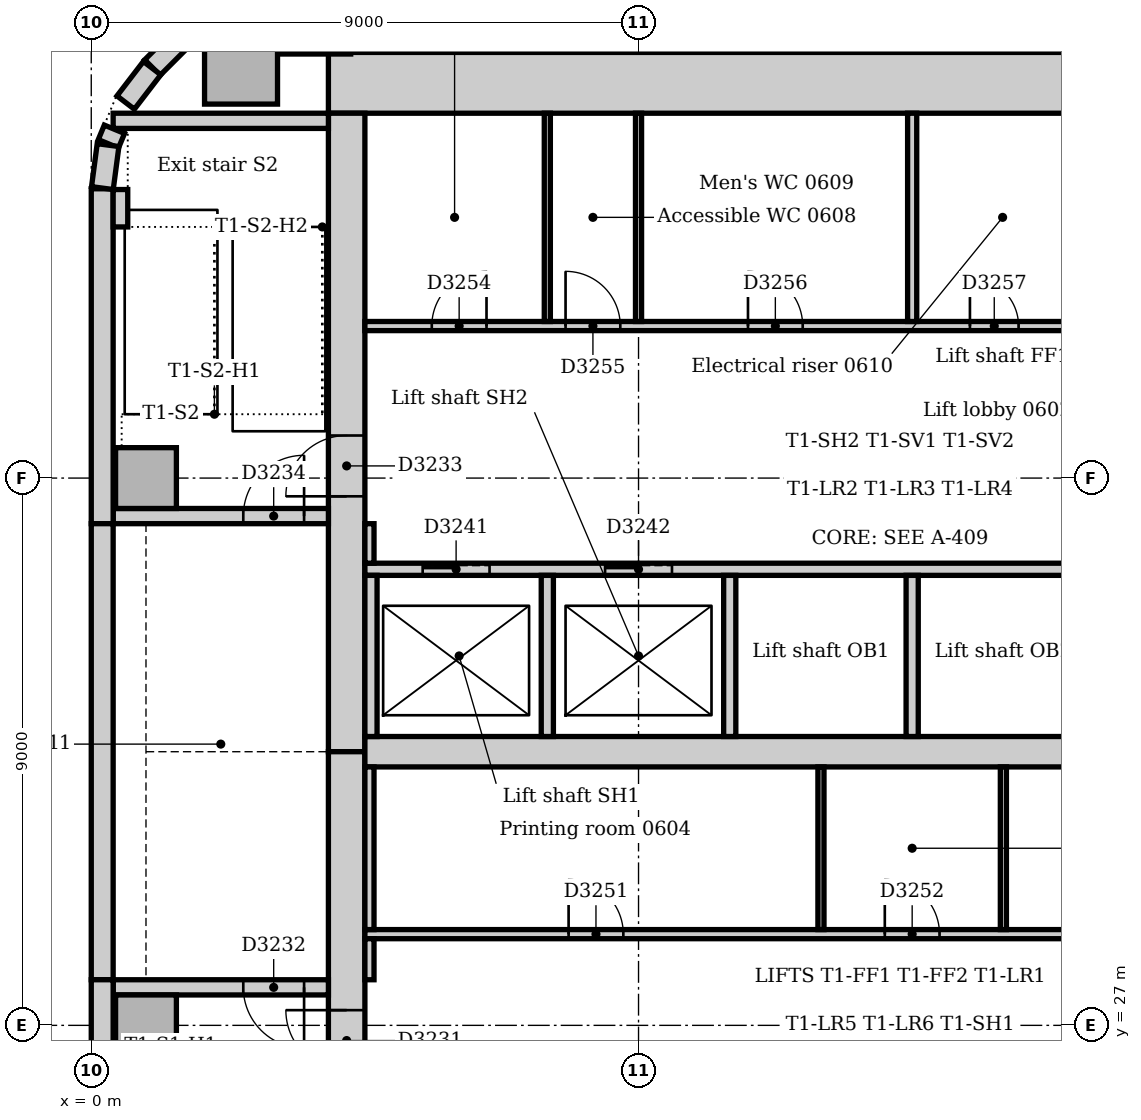
"""IFC4 building model, lengths in metres.
Left out: names, types, materials, properties, quantities, classifications, styles, units other than length and angle.
Written with IfcOpenShell. Run it as: python <this file> out.ifc"""

import sys

from ifc_helpers import new_model, si_unit, direction, frame, frame_2d, origin, origin_2d, place, context, subcontext, project, spatial, rectangle, extrude, element, fill, save


model = new_model("IFC4")
c1 = context("Model", 3, precision=1e-05, world=origin(), true_north=direction((0.0, 1.0)))
c2 = subcontext(c1, "Body", "Model", "MODEL_VIEW")
j1 = project(units=[si_unit("LENGTHUNIT", "METRE"), si_unit("PLANEANGLEUNIT", "RADIAN")], contexts=[c1])
p1 = place(None, origin())
s1 = spatial("IfcSite", under=j1, at=p1, CompositionType="ELEMENT")
p2 = place(p1, origin())
s2 = spatial("IfcBuilding", under=s1, at=p2, CompositionType="ELEMENT")
p3 = place(p2, frame((0.0, 0.0, 30.0)))
s3 = spatial("IfcBuildingStorey", under=s2, at=p3, CompositionType="ELEMENT", Elevation=30.0)
p4 = place(p3, frame((23.5, 42.5, 0.0), z_axis=(0.0, 0.0, 1.0), x_axis=(-1.0, 0.0, 0.0)))
e1 = element("IfcWall", 1, at=p4, inside=s3, PredefinedType="SOLIDWALL", context=c2, shape_type="SweptSolid", body=[
    extrude(rectangle(XDim=19.6, YDim=1.0, at=frame_2d((9.8, 0.0))), origin(), (0.0, 0.0, 1.0), 4.0),
])
p5 = place(p3, frame((4.2, 42.0, 0.0), z_axis=(0.0, 0.0, 1.0), x_axis=(0.0, -1.0, 0.0)))
e2 = element("IfcWall", 2, at=p5, inside=s3, PredefinedType="SOLIDWALL", context=c2, shape_type="SweptSolid", body=[
    extrude(rectangle(XDim=10.5, YDim=0.6, at=frame_2d((5.25, 0.0))), origin(), (0.0, 0.0, 1.0), 4.0),
])
p6 = place(p5, frame((5.3, 0.0, 0.0)))
e3 = element("IfcOpeningElement", 3, at=p6, cuts=e2, PredefinedType="OPENING", context=c2, shape_type="SweptSolid", body=[
    extrude(rectangle(XDim=1.0, YDim=2.1, at=frame_2d((0.5, 1.05))), frame((0.0, 0.31, 0.0), z_axis=(0.0, -1.0, 0.0), x_axis=(1.0, 0.0, 0.0)), (0.0, 0.0, 1.0), 0.62),
])
p7 = place(p3, frame((4.2, 31.5, 0.0), z_axis=(0.0, 0.0, 1.0), x_axis=(0.0, -1.0, 0.0)))
e4 = element("IfcWall", 4, at=p7, inside=s3, PredefinedType="SOLIDWALL", context=c2, shape_type="SweptSolid", body=[
    extrude(rectangle(XDim=10.5, YDim=0.6, at=frame_2d((5.25, 0.0))), origin(), (0.0, 0.0, 1.0), 4.0),
])
p8 = place(p7, frame((4.25, 0.0, 0.0)))
e5 = element("IfcOpeningElement", 5, at=p8, cuts=e4, PredefinedType="OPENING", context=c2, shape_type="SweptSolid", body=[
    extrude(rectangle(XDim=1.0, YDim=2.1, at=frame_2d((0.5, 1.05))), frame((0.0, 0.31, 0.0), z_axis=(0.0, -1.0, 0.0), x_axis=(1.0, 0.0, 0.0)), (0.0, 0.0, 1.0), 0.62),
])
p9 = place(p3, frame((4.5, 31.5, 0.0), z_axis=(0.0, 0.0, 1.0), x_axis=(1.0, 0.0, 0.0)))
e6 = element("IfcWall", 6, at=p9, inside=s3, PredefinedType="SOLIDWALL", context=c2, shape_type="SweptSolid", body=[
    extrude(rectangle(XDim=18.0, YDim=0.5, at=frame_2d((9.0, 0.0))), origin(), (0.0, 0.0, 1.0), 4.0),
])
p10 = place(p3, frame((3.9, 27.625, 0.0), z_axis=(0.0, 0.0, 1.0), x_axis=(-1.0, 0.0, 0.0)))
e7 = element("IfcWall", 7, at=p10, inside=s3, PredefinedType="SOLIDWALL", context=c2, shape_type="SweptSolid", body=[
    extrude(rectangle(XDim=3.54, YDim=0.25, at=frame_2d((1.77, 0.0))), origin(), (0.0, 0.0, 1.0), 4.0),
])
p11 = place(p10, frame((0.4, 0.0, 0.0)))
e8 = element("IfcOpeningElement", 8, at=p11, cuts=e7, PredefinedType="OPENING", context=c2, shape_type="SweptSolid", body=[
    extrude(rectangle(XDim=1.0, YDim=2.1, at=frame_2d((0.5, 1.05))), frame((0.0, 0.135, 0.0), z_axis=(0.0, -1.0, 0.0), x_axis=(1.0, 0.0, 0.0)), (0.0, 0.0, 1.0), 0.27),
])
p12 = place(p3, frame((0.36, 35.375, 0.0), z_axis=(0.0, 0.0, 1.0), x_axis=(1.0, 0.0, 0.0)))
e9 = element("IfcWall", 9, at=p12, inside=s3, PredefinedType="SOLIDWALL", context=c2, shape_type="SweptSolid", body=[
    extrude(rectangle(XDim=3.54, YDim=0.25, at=frame_2d((1.77, 0.0))), origin(), (0.0, 0.0, 1.0), 4.0),
])
p13 = place(p12, frame((2.14, 0.0, 0.0)))
e10 = element("IfcOpeningElement", 10, at=p13, cuts=e9, PredefinedType="OPENING", context=c2, shape_type="SweptSolid", body=[
    extrude(rectangle(XDim=1.0, YDim=2.1, at=frame_2d((0.5, 1.05))), frame((0.0, 0.135, 0.0), z_axis=(0.0, -1.0, 0.0), x_axis=(1.0, 0.0, 0.0)), (0.0, 0.0, 1.0), 0.27),
])
p14 = place(p3, frame((3.9, 41.875, 0.0), z_axis=(0.0, 0.0, 1.0), x_axis=(-1.0, 0.0, 0.0)))
e11 = element("IfcWall", 11, at=p14, inside=s3, PredefinedType="SOLIDWALL", context=c2, shape_type="SweptSolid", body=[
    extrude(rectangle(XDim=3.54, YDim=0.25, at=frame_2d((1.77, 0.0))), origin(), (0.0, 0.0, 1.0), 4.0),
])
for number, where, z_axis, x_axis in (
    (12, (3.667, 43.574, 0.0), (0.0, 0.0, 1.0), (1.0, 0.0, 0.0)),
    (13, (2.463, 42.75, 0.0), (0.0, 0.0, 1.0), (1.0, 0.0, 0.0)),
):
    element("IfcColumn", number, at=place(p3, frame(where, z_axis=z_axis, x_axis=x_axis)), inside=s3, PredefinedType="COLUMN", context=c2, shape_type="SweptSolid", body=[
        extrude(rectangle(XDim=1.2, YDim=1.2, at=origin_2d()), origin(), (0.0, 0.0, 1.0), 3.85),
    ])
for number, where, z_axis, x_axis in (
    (14, (0.9, 27.0, 0.0), (0.0, 0.0, 1.0), (1.0, 0.0, 0.0)),
    (15, (0.9, 36.0, 0.0), (0.0, 0.0, 1.0), (1.0, 0.0, 0.0)),
):
    element("IfcColumn", number, at=place(p3, frame(where, z_axis=z_axis, x_axis=x_axis)), inside=s3, PredefinedType="COLUMN", context=c2, shape_type="SweptSolid", body=[
        extrude(rectangle(XDim=1.0, YDim=1.0, at=origin_2d()), origin(), (0.0, 0.0, 1.0), 4.0),
    ])
p15 = place(p3, frame((2.249, 43.994, 0.0), z_axis=(0.0, 0.0, 1.0), x_axis=(-0.707106781187, -0.707106781187, 0.0)))
e16 = element("IfcWall", 16, at=p15, inside=s3, PredefinedType="STANDARD", context=c2, shape_type="SweptSolid", body=[
    extrude(rectangle(XDim=1.757, YDim=0.36, at=frame_2d((0.879, 0.0))), origin(), (0.0, 0.0, 1.0), 3.85),
])
p16 = place(p3, frame((0.18, 40.757, 0.0), z_axis=(0.0, 0.0, 1.0), x_axis=(0.0, -1.0, 0.0)))
e17 = element("IfcWall", 17, at=p16, inside=s3, PredefinedType="STANDARD", context=c2, shape_type="SweptSolid", body=[
    extrude(rectangle(XDim=5.507, YDim=0.36, at=frame_2d((2.754, 0.0))), origin(), (0.0, 0.0, 1.0), 3.85),
])
p17 = place(p3, frame((0.18, 35.25, 0.0), z_axis=(0.0, 0.0, 1.0), x_axis=(0.0, -1.0, 0.0)))
e18 = element("IfcWall", 18, at=p17, inside=s3, PredefinedType="STANDARD", context=c2, shape_type="SweptSolid", body=[
    extrude(rectangle(XDim=7.5, YDim=0.36, at=frame_2d((3.75, 0.0))), origin(), (0.0, 0.0, 1.0), 3.85),
])
p18 = place(p3, frame((0.18, 27.75, 0.0), z_axis=(0.0, 0.0, 1.0), x_axis=(0.0, -1.0, 0.0)))
e19 = element("IfcWall", 19, at=p18, inside=s3, PredefinedType="STANDARD", context=c2, shape_type="SweptSolid", body=[
    extrude(rectangle(XDim=6.75, YDim=0.36, at=frame_2d((3.375, 0.0))), origin(), (0.0, 0.0, 1.0), 3.85),
])
p19 = place(p3, frame((1.0, 42.741, 0.0), z_axis=(0.0, 0.0, 1.0), x_axis=(-0.608802368033, -0.793321924995, 0.0)))
e20 = element("IfcWall", 20, at=p19, inside=s3, PredefinedType="STANDARD", context=c2, shape_type="SweptSolid", body=[
    extrude(rectangle(XDim=0.713, YDim=0.36, at=frame_2d((0.357, 0.0))), origin(), (0.0, 0.0, 1.0), 3.85),
])
p20 = place(p3, frame((0.381, 41.736, 0.0), z_axis=(0.0, 0.0, 1.0), x_axis=(-0.382773360986, -0.923842277729, 0.0)))
e21 = element("IfcWall", 21, at=p20, inside=s3, PredefinedType="STANDARD", context=c2, shape_type="SweptSolid", body=[
    extrude(rectangle(XDim=0.258, YDim=0.36, at=frame_2d((0.129, 0.0))), origin(), (0.0, 0.0, 1.0), 3.85),
])
p21 = place(p3, frame((0.276, 41.476, 0.0), z_axis=(0.0, 0.0, 1.0), x_axis=(-0.13055608231, -0.99144092581, 0.0)))
e22 = element("IfcWall", 22, at=p21, inside=s3, PredefinedType="STANDARD", context=c2, shape_type="SweptSolid", body=[
    extrude(rectangle(XDim=0.713, YDim=0.36, at=frame_2d((0.356, 0.0))), origin(), (0.0, 0.0, 1.0), 3.85),
])
p22 = place(p3, frame((0.48, 40.13, 0.0), z_axis=(0.0, 0.0, 1.0), x_axis=(0.0, 1.0, 0.0)))
e23 = element("IfcWall", 23, at=p22, inside=s3, PredefinedType="STANDARD", context=c2, shape_type="SweptSolid", body=[
    extrude(rectangle(XDim=0.615, YDim=0.24, at=frame_2d((0.307, 0.0))), origin(), (0.0, 0.0, 1.0), 4.0),
])
p23 = place(p3, frame((4.5, 34.5, 0.0), z_axis=(0.0, 0.0, 1.0), x_axis=(1.0, 0.0, 0.0)))
e24 = element("IfcWall", 24, at=p23, inside=s3, PredefinedType="PARTITIONING", context=c2, shape_type="SweptSolid", body=[
    extrude(rectangle(XDim=18.0, YDim=0.2, at=frame_2d((9.0, 0.0))), origin(), (0.0, 0.0, 1.0), 3.85),
])
p24 = place(p23, frame((0.95, 0.0, 0.0)))
e25 = element("IfcOpeningElement", 25, at=p24, cuts=e24, PredefinedType="OPENING", context=c2, shape_type="SweptSolid", body=[
    extrude(rectangle(XDim=1.1, YDim=2.1, at=frame_2d((0.55, 1.05))), frame((0.0, 0.11, 0.0), z_axis=(0.0, -1.0, 0.0), x_axis=(1.0, 0.0, 0.0)), (0.0, 0.0, 1.0), 0.22),
])
p25 = place(p23, frame((3.95, 0.0, 0.0)))
e26 = element("IfcOpeningElement", 26, at=p25, cuts=e24, PredefinedType="OPENING", context=c2, shape_type="SweptSolid", body=[
    extrude(rectangle(XDim=1.1, YDim=2.1, at=frame_2d((0.55, 1.05))), frame((0.0, 0.11, 0.0), z_axis=(0.0, -1.0, 0.0), x_axis=(1.0, 0.0, 0.0)), (0.0, 0.0, 1.0), 0.22),
])
p26 = place(p23, frame((12.95, 0.0, 0.0)))
e27 = element("IfcOpeningElement", 27, at=p26, cuts=e24, PredefinedType="OPENING", context=c2, shape_type="SweptSolid", body=[
    extrude(rectangle(XDim=1.1, YDim=2.1, at=frame_2d((0.55, 1.05))), frame((0.0, 0.11, 0.0), z_axis=(0.0, -1.0, 0.0), x_axis=(1.0, 0.0, 0.0)), (0.0, 0.0, 1.0), 0.22),
])
p27 = place(p23, frame((15.95, 0.0, 0.0)))
e28 = element("IfcOpeningElement", 28, at=p27, cuts=e24, PredefinedType="OPENING", context=c2, shape_type="SweptSolid", body=[
    extrude(rectangle(XDim=1.1, YDim=2.1, at=frame_2d((0.55, 1.05))), frame((0.0, 0.11, 0.0), z_axis=(0.0, -1.0, 0.0), x_axis=(1.0, 0.0, 0.0)), (0.0, 0.0, 1.0), 0.22),
])
for number, where, z_axis, x_axis in (
    (29, (4.6, 31.75, 0.0), (0.0, 0.0, 1.0), (0.0, 1.0, 0.0)),
    (30, (7.5, 31.75, 0.0), (0.0, 0.0, 1.0), (0.0, 1.0, 0.0)),
    (31, (10.5, 31.75, 0.0), (0.0, 0.0, 1.0), (0.0, 1.0, 0.0)),
    (32, (13.5, 31.75, 0.0), (0.0, 0.0, 1.0), (0.0, 1.0, 0.0)),
):
    element("IfcWall", number, at=place(p3, frame(where, z_axis=z_axis, x_axis=x_axis)), inside=s3, PredefinedType="PARTITIONING", context=c2, shape_type="SweptSolid", body=[
        extrude(rectangle(XDim=2.65, YDim=0.2, at=frame_2d((1.325, 0.0))), origin(), (0.0, 0.0, 1.0), 3.85),
    ])
p28 = place(p3, frame((4.5, 28.5, 0.0), z_axis=(0.0, 0.0, 1.0), x_axis=(1.0, 0.0, 0.0)))
e33 = element("IfcWall", 33, at=p28, inside=s3, PredefinedType="PARTITIONING", context=c2, shape_type="SweptSolid", body=[
    extrude(rectangle(XDim=18.0, YDim=0.15, at=frame_2d((9.0, 0.0))), origin(), (0.0, 0.0, 1.0), 3.85),
])
p29 = place(p28, frame((3.35, 0.0, 0.0)))
e34 = element("IfcOpeningElement", 34, at=p29, cuts=e33, PredefinedType="OPENING", context=c2, shape_type="SweptSolid", body=[
    extrude(rectangle(XDim=0.9, YDim=2.1, at=frame_2d((0.45, 1.05))), frame((0.0, 0.085, 0.0), z_axis=(0.0, -1.0, 0.0), x_axis=(1.0, 0.0, 0.0)), (0.0, 0.0, 1.0), 0.17),
])
p30 = place(p28, frame((8.55, 0.0, 0.0)))
e35 = element("IfcOpeningElement", 35, at=p30, cuts=e33, PredefinedType="OPENING", context=c2, shape_type="SweptSolid", body=[
    extrude(rectangle(XDim=0.9, YDim=2.1, at=frame_2d((0.45, 1.05))), frame((0.0, 0.085, 0.0), z_axis=(0.0, -1.0, 0.0), x_axis=(1.0, 0.0, 0.0)), (0.0, 0.0, 1.0), 0.17),
])
p31 = place(p28, frame((13.7, 0.0, 0.0)))
e36 = element("IfcOpeningElement", 36, at=p31, cuts=e33, PredefinedType="OPENING", context=c2, shape_type="SweptSolid", body=[
    extrude(rectangle(XDim=0.9, YDim=2.1, at=frame_2d((0.45, 1.05))), frame((0.0, 0.085, 0.0), z_axis=(0.0, -1.0, 0.0), x_axis=(1.0, 0.0, 0.0)), (0.0, 0.0, 1.0), 0.17),
])
p32 = place(p3, frame((4.5, 38.5, 0.0), z_axis=(0.0, 0.0, 1.0), x_axis=(1.0, 0.0, 0.0)))
e37 = element("IfcWall", 37, at=p32, inside=s3, PredefinedType="PARTITIONING", context=c2, shape_type="SweptSolid", body=[
    extrude(rectangle(XDim=11.9, YDim=0.15, at=frame_2d((5.95, 0.0))), origin(), (0.0, 0.0, 1.0), 3.85),
])
p33 = place(p32, frame((1.1, 0.0, 0.0)))
e38 = element("IfcOpeningElement", 38, at=p33, cuts=e37, PredefinedType="OPENING", context=c2, shape_type="SweptSolid", body=[
    extrude(rectangle(XDim=0.9, YDim=2.1, at=frame_2d((0.45, 1.05))), frame((0.0, 0.085, 0.0), z_axis=(0.0, -1.0, 0.0), x_axis=(1.0, 0.0, 0.0)), (0.0, 0.0, 1.0), 0.17),
])
p34 = place(p32, frame((3.3, 0.0, 0.0)))
e39 = element("IfcOpeningElement", 39, at=p34, cuts=e37, PredefinedType="OPENING", context=c2, shape_type="SweptSolid", body=[
    extrude(rectangle(XDim=0.9, YDim=2.1, at=frame_2d((0.45, 1.05))), frame((0.0, 0.085, 0.0), z_axis=(0.0, -1.0, 0.0), x_axis=(1.0, 0.0, 0.0)), (0.0, 0.0, 1.0), 0.17),
])
p35 = place(p32, frame((6.3, 0.0, 0.0)))
e40 = element("IfcOpeningElement", 40, at=p35, cuts=e37, PredefinedType="OPENING", context=c2, shape_type="SweptSolid", body=[
    extrude(rectangle(XDim=0.9, YDim=2.1, at=frame_2d((0.45, 1.05))), frame((0.0, 0.085, 0.0), z_axis=(0.0, -1.0, 0.0), x_axis=(1.0, 0.0, 0.0)), (0.0, 0.0, 1.0), 0.17),
])
p36 = place(p32, frame((9.95, 0.0, 0.0)))
e41 = element("IfcOpeningElement", 41, at=p36, cuts=e37, PredefinedType="OPENING", context=c2, shape_type="SweptSolid", body=[
    extrude(rectangle(XDim=0.8, YDim=2.1, at=frame_2d((0.4, 1.05))), frame((0.0, 0.085, 0.0), z_axis=(0.0, -1.0, 0.0), x_axis=(1.0, 0.0, 0.0)), (0.0, 0.0, 1.0), 0.17),
])
p37 = place(p3, frame((4.575, 27.75, 0.0), z_axis=(0.0, 0.0, 1.0), x_axis=(0.0, 1.0, 0.0)))
e42 = element("IfcWall", 42, at=p37, inside=s3, PredefinedType="PARTITIONING", context=c2, shape_type="SweptSolid", body=[
    extrude(rectangle(XDim=0.675, YDim=0.15, at=frame_2d((0.338, 0.0))), origin(), (0.0, 0.0, 1.0), 3.85),
])
p38 = place(p3, frame((4.575, 28.575, 0.0), z_axis=(0.0, 0.0, 1.0), x_axis=(0.0, 1.0, 0.0)))
e43 = element("IfcWall", 43, at=p38, inside=s3, PredefinedType="PARTITIONING", context=c2, shape_type="SweptSolid", body=[
    extrude(rectangle(XDim=2.675, YDim=0.15, at=frame_2d((1.337, 0.0))), origin(), (0.0, 0.0, 1.0), 3.85),
])
p39 = place(p3, frame((4.575, 34.6, 0.0), z_axis=(0.0, 0.0, 1.0), x_axis=(0.0, 1.0, 0.0)))
e44 = element("IfcWall", 44, at=p39, inside=s3, PredefinedType="PARTITIONING", context=c2, shape_type="SweptSolid", body=[
    extrude(rectangle(XDim=0.65, YDim=0.15, at=frame_2d((0.325, 0.0))), origin(), (0.0, 0.0, 1.0), 3.85),
])
p40 = place(p3, frame((13.5, 38.575, 0.0), z_axis=(0.0, 0.0, 1.0), x_axis=(0.0, 1.0, 0.0)))
e45 = element("IfcWall", 45, at=p40, inside=s3, PredefinedType="PARTITIONING", context=c2, shape_type="SweptSolid", body=[
    extrude(rectangle(XDim=3.425, YDim=0.15, at=frame_2d((1.712, 0.0))), origin(), (0.0, 0.0, 1.0), 3.85),
])
for number, where, z_axis, x_axis in (
    (46, (7.5, 38.575, 0.0), (0.0, 0.0, 1.0), (0.0, 1.0, 0.0)),
    (47, (9.0, 38.575, 0.0), (0.0, 0.0, 1.0), (0.0, 1.0, 0.0)),
):
    element("IfcWall", number, at=place(p3, frame(where, z_axis=z_axis, x_axis=x_axis)), inside=s3, PredefinedType="PARTITIONING", context=c2, shape_type="SweptSolid", body=[
        extrude(rectangle(XDim=3.425, YDim=0.1, at=frame_2d((1.712, 0.0))), origin(), (0.0, 0.0, 1.0), 3.85),
    ])
for number, where, z_axis, x_axis in (
    (48, (12.0, 28.575, 0.0), (0.0, 0.0, 1.0), (0.0, 1.0, 0.0)),
    (49, (15.0, 28.575, 0.0), (0.0, 0.0, 1.0), (0.0, 1.0, 0.0)),
):
    element("IfcWall", number, at=place(p3, frame(where, z_axis=z_axis, x_axis=x_axis)), inside=s3, PredefinedType="PARTITIONING", context=c2, shape_type="SweptSolid", body=[
        extrude(rectangle(XDim=2.675, YDim=0.1, at=frame_2d((1.337, 0.0))), origin(), (0.0, 0.0, 1.0), 3.85),
    ])
p41 = place(p8, frame((1.0, 0.0, 0.0), z_axis=(0.0, 0.0, 1.0), x_axis=(-1.0, 0.0, 0.0)))
e50 = element("IfcDoor", 50, at=p41, inside=s3, OperationType="SINGLE_SWING_RIGHT", PredefinedType="DOOR", context=c2, shape_type="SweptSolid", body=[
    extrude(rectangle(XDim=1.0, YDim=2.1, at=frame_2d((0.5, 1.05))), frame((0.0, 0.025, 0.0), z_axis=(0.0, -1.0, 0.0), x_axis=(1.0, 0.0, 0.0)), (0.0, 0.0, 1.0), 0.05),
])
fill(e5, e50)
p42 = place(p11, origin())
e51 = element("IfcDoor", 51, at=p42, inside=s3, OperationType="SINGLE_SWING_LEFT", PredefinedType="DOOR", context=c2, shape_type="SweptSolid", body=[
    extrude(rectangle(XDim=1.0, YDim=2.1, at=frame_2d((0.5, 1.05))), frame((0.0, 0.025, 0.0), z_axis=(0.0, -1.0, 0.0), x_axis=(1.0, 0.0, 0.0)), (0.0, 0.0, 1.0), 0.05),
])
fill(e8, e51)
p43 = place(p6, frame((1.0, 0.0, 0.0), z_axis=(0.0, 0.0, 1.0), x_axis=(-1.0, 0.0, 0.0)))
e52 = element("IfcDoor", 52, at=p43, inside=s3, OperationType="SINGLE_SWING_LEFT", PredefinedType="DOOR", context=c2, shape_type="SweptSolid", body=[
    extrude(rectangle(XDim=1.0, YDim=2.1, at=frame_2d((0.5, 1.05))), frame((0.0, 0.025, 0.0), z_axis=(0.0, -1.0, 0.0), x_axis=(1.0, 0.0, 0.0)), (0.0, 0.0, 1.0), 0.05),
])
fill(e3, e52)
p44 = place(p13, origin())
e53 = element("IfcDoor", 53, at=p44, inside=s3, OperationType="SINGLE_SWING_RIGHT", PredefinedType="DOOR", context=c2, shape_type="SweptSolid", body=[
    extrude(rectangle(XDim=1.0, YDim=2.1, at=frame_2d((0.5, 1.05))), frame((0.0, 0.025, 0.0), z_axis=(0.0, -1.0, 0.0), x_axis=(1.0, 0.0, 0.0)), (0.0, 0.0, 1.0), 0.05),
])
fill(e10, e53)
p45 = place(p24, origin())
e54 = element("IfcDoor", 54, at=p45, inside=s3, OperationType="SLIDING_TO_LEFT", PredefinedType="DOOR", context=c2, shape_type="SweptSolid", body=[
    extrude(rectangle(XDim=1.1, YDim=2.1, at=frame_2d((0.55, 1.05))), frame((0.0, 0.025, 0.0), z_axis=(0.0, -1.0, 0.0), x_axis=(1.0, 0.0, 0.0)), (0.0, 0.0, 1.0), 0.05),
])
fill(e25, e54)
p46 = place(p25, origin())
e55 = element("IfcDoor", 55, at=p46, inside=s3, OperationType="SLIDING_TO_LEFT", PredefinedType="DOOR", context=c2, shape_type="SweptSolid", body=[
    extrude(rectangle(XDim=1.1, YDim=2.1, at=frame_2d((0.55, 1.05))), frame((0.0, 0.025, 0.0), z_axis=(0.0, -1.0, 0.0), x_axis=(1.0, 0.0, 0.0)), (0.0, 0.0, 1.0), 0.05),
])
fill(e26, e55)
p47 = place(p29, origin())
e56 = element("IfcDoor", 56, at=p47, inside=s3, OperationType="SINGLE_SWING_LEFT", PredefinedType="DOOR", context=c2, shape_type="SweptSolid", body=[
    extrude(rectangle(XDim=0.9, YDim=2.1, at=frame_2d((0.45, 1.05))), frame((0.0, 0.025, 0.0), z_axis=(0.0, -1.0, 0.0), x_axis=(1.0, 0.0, 0.0)), (0.0, 0.0, 1.0), 0.05),
])
fill(e34, e56)
p48 = place(p30, origin())
e57 = element("IfcDoor", 57, at=p48, inside=s3, OperationType="SINGLE_SWING_LEFT", PredefinedType="DOOR", context=c2, shape_type="SweptSolid", body=[
    extrude(rectangle(XDim=0.9, YDim=2.1, at=frame_2d((0.45, 1.05))), frame((0.0, 0.025, 0.0), z_axis=(0.0, -1.0, 0.0), x_axis=(1.0, 0.0, 0.0)), (0.0, 0.0, 1.0), 0.05),
])
fill(e35, e57)
p49 = place(p33, origin())
e58 = element("IfcDoor", 58, at=p49, inside=s3, OperationType="SINGLE_SWING_RIGHT", PredefinedType="DOOR", context=c2, shape_type="SweptSolid", body=[
    extrude(rectangle(XDim=0.9, YDim=2.1, at=frame_2d((0.45, 1.05))), frame((0.0, 0.025, 0.0), z_axis=(0.0, -1.0, 0.0), x_axis=(1.0, 0.0, 0.0)), (0.0, 0.0, 1.0), 0.05),
])
fill(e38, e58)
p50 = place(p34, origin())
e59 = element("IfcDoor", 59, at=p50, inside=s3, OperationType="SINGLE_SWING_LEFT", PredefinedType="DOOR", context=c2, shape_type="SweptSolid", body=[
    extrude(rectangle(XDim=0.9, YDim=2.1, at=frame_2d((0.45, 1.05))), frame((0.0, 0.025, 0.0), z_axis=(0.0, -1.0, 0.0), x_axis=(1.0, 0.0, 0.0)), (0.0, 0.0, 1.0), 0.05),
])
fill(e39, e59)
p51 = place(p35, origin())
e60 = element("IfcDoor", 60, at=p51, inside=s3, OperationType="SINGLE_SWING_LEFT", PredefinedType="DOOR", context=c2, shape_type="SweptSolid", body=[
    extrude(rectangle(XDim=0.9, YDim=2.1, at=frame_2d((0.45, 1.05))), frame((0.0, 0.025, 0.0), z_axis=(0.0, -1.0, 0.0), x_axis=(1.0, 0.0, 0.0)), (0.0, 0.0, 1.0), 0.05),
])
fill(e40, e60)
p52 = place(p36, origin())
e61 = element("IfcDoor", 61, at=p52, inside=s3, OperationType="SINGLE_SWING_LEFT", PredefinedType="DOOR", context=c2, shape_type="SweptSolid", body=[
    extrude(rectangle(XDim=0.8, YDim=2.1, at=frame_2d((0.4, 1.05))), frame((0.0, 0.025, 0.0), z_axis=(0.0, -1.0, 0.0), x_axis=(1.0, 0.0, 0.0)), (0.0, 0.0, 1.0), 0.05),
])
fill(e41, e61)
save(model, sys.argv[1])
